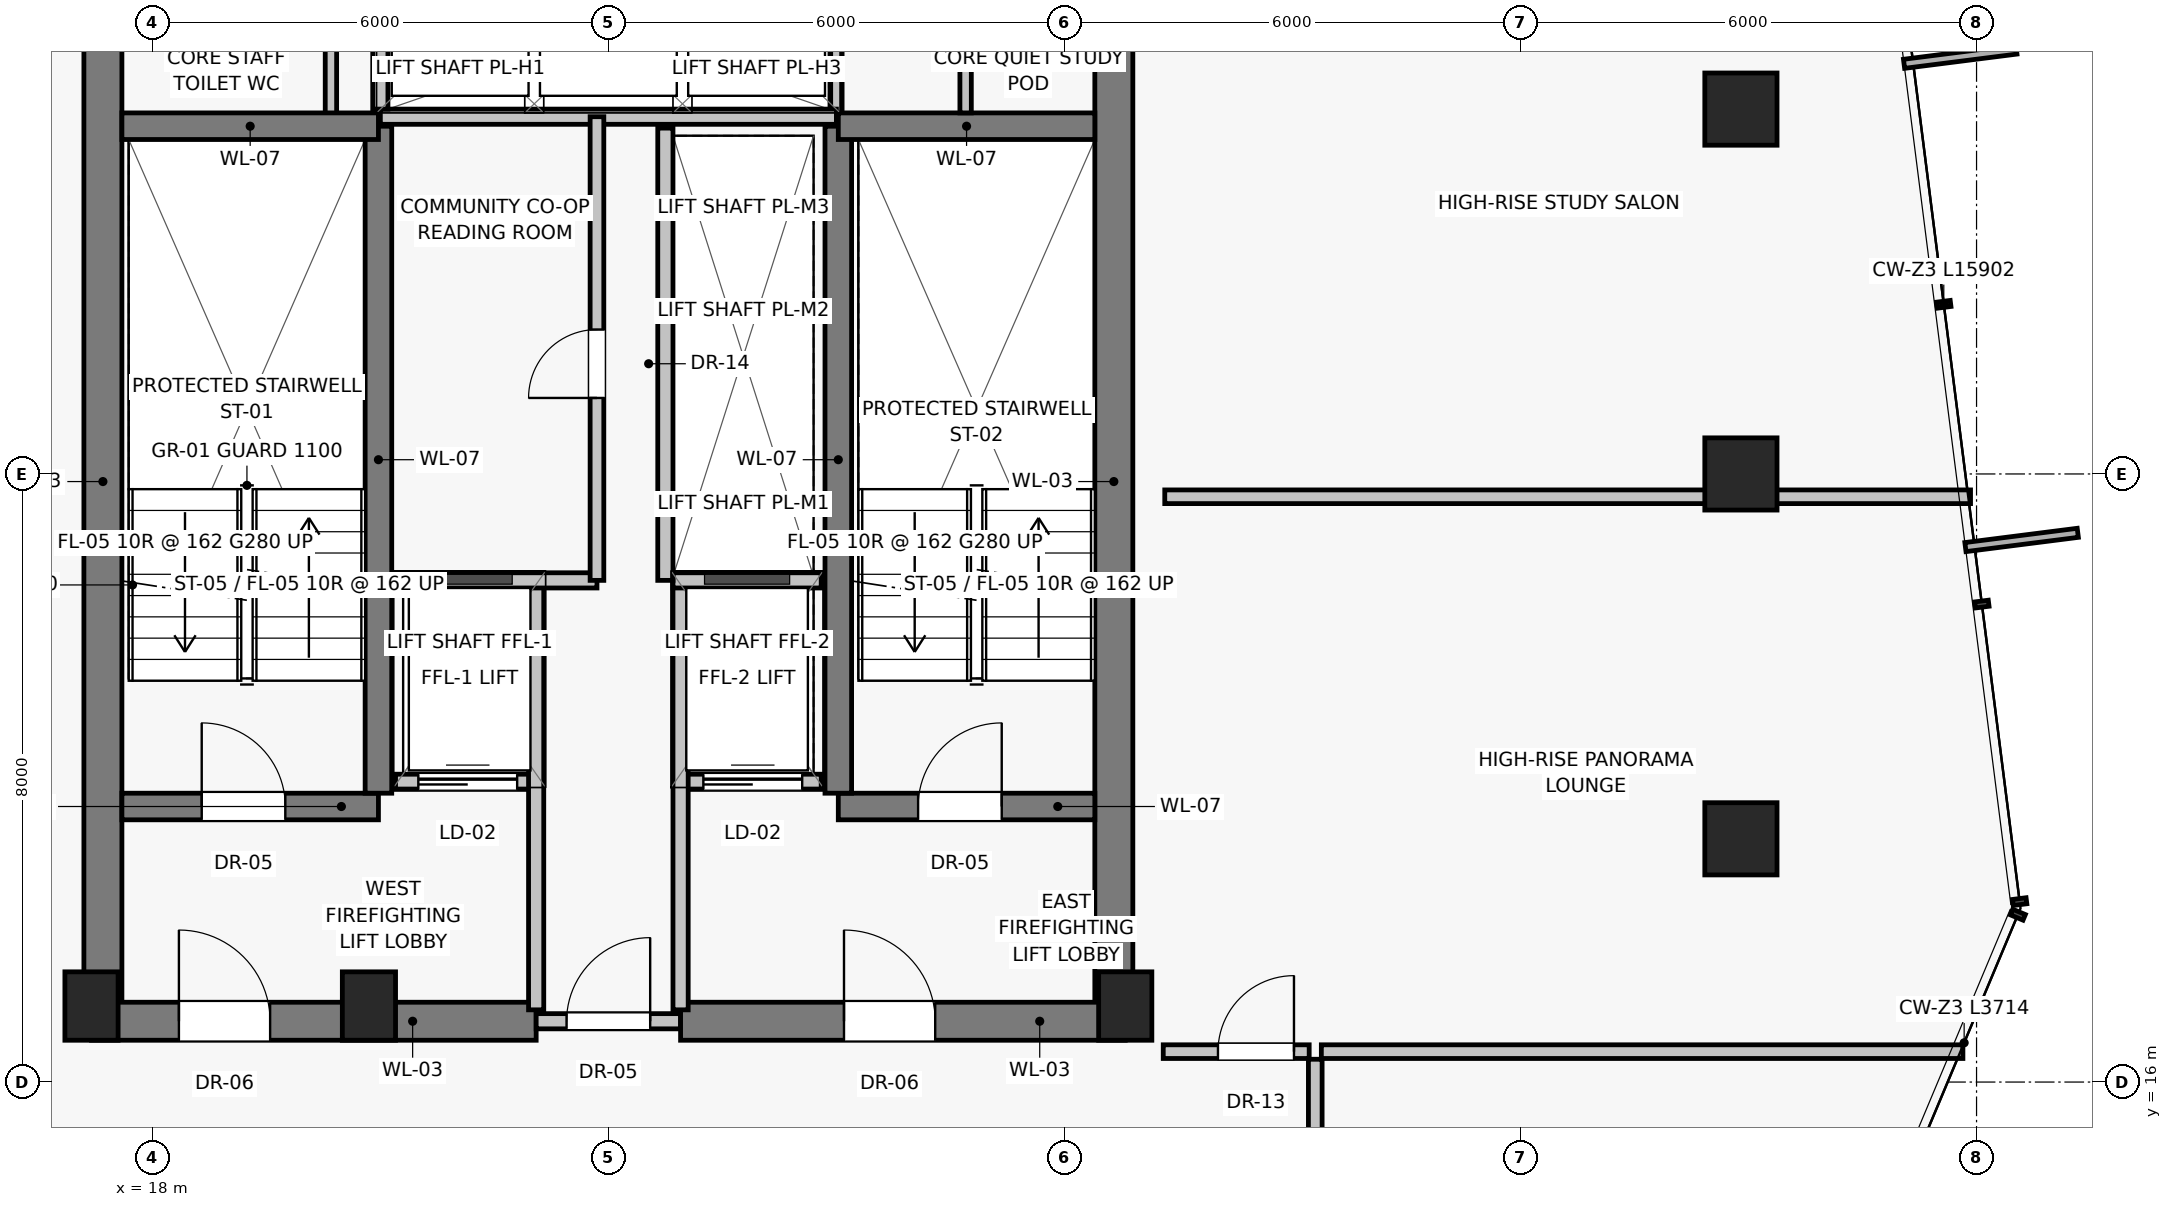
"""IFC4 building model, lengths in metres.
Left out: names, types, materials, properties, quantities, classifications, styles, units other than length and angle.
Written with IfcOpenShell. Run it as: python <this file> out.ifc"""

import sys

from ifc_helpers import new_model, si_unit, direction, frame, frame_2d, origin, origin_2d, place, context, subcontext, project, spatial, rectangle, extrude, source, transform, mapped, element, fill, save


model = new_model("IFC4")
c1 = context("Model", 3, precision=1e-05, world=origin(), true_north=direction((0.0, 1.0)))
c2 = subcontext(c1, "Body", "Model", "MODEL_VIEW")
j1 = project(units=[si_unit("LENGTHUNIT", "METRE"), si_unit("PLANEANGLEUNIT", "RADIAN")], contexts=[c1])
p1 = place(None, origin())
s1 = spatial("IfcSite", under=j1, at=p1, CompositionType="ELEMENT")
p2 = place(p1, origin())
s2 = spatial("IfcBuilding", under=s1, at=p2, CompositionType="ELEMENT")
p3 = place(p2, frame((0.0, 0.0, 182.1)))
s3 = spatial("IfcBuildingStorey", under=s2, at=p3, CompositionType="ELEMENT", Elevation=182.1)
for number, where, z_axis, x_axis in (
    (1, (17.2, 17.0, 0.0), (0.0, 0.0, 1.0), (1.0, 0.0, 0.0)),
    (2, (20.85, 17.0, 0.0), (0.0, 0.0, 1.0), (1.0, 0.0, 0.0)),
    (3, (30.8, 17.0, 0.0), (0.0, 0.0, 1.0), (1.0, 0.0, 0.0)),
):
    element("IfcColumn", number, at=place(p3, frame(where, z_axis=z_axis, x_axis=x_axis)), inside=s3, PredefinedType="PILASTER", context=c2, shape_type="SweptSolid", body=[
        extrude(rectangle(XDim=0.7, YDim=0.9, at=origin_2d()), origin(), (0.0, 0.0, 1.0), 3.25),
    ])
for number, where, z_axis, x_axis in (
    (4, (38.9, 19.2, 0.0), (0.0, 0.0, 1.0), (1.0, 0.0, 0.0)),
    (5, (38.9, 24.0, 0.0), (0.0, 0.0, 1.0), (1.0, 0.0, 0.0)),
    (6, (38.9, 28.8, 0.0), (0.0, 0.0, 1.0), (1.0, 0.0, 0.0)),
):
    element("IfcColumn", number, at=place(p3, frame(where, z_axis=z_axis, x_axis=x_axis)), inside=s3, PredefinedType="COLUMN", context=c2, shape_type="SweptSolid", body=[
        extrude(rectangle(XDim=0.95, YDim=0.95, at=origin_2d()), origin(), (0.0, 0.0, 1.0), 3.25),
    ])
for number, where, z_axis, x_axis in (
    (7, (17.35, 16.8, 0.0), (0.0, 0.0, 1.0), (0.0, 1.0, 0.0)),
    (8, (30.65, 16.8, 0.0), (0.0, 0.0, 1.0), (0.0, 1.0, 0.0)),
):
    element("IfcWall", number, at=place(p3, frame(where, z_axis=z_axis, x_axis=x_axis)), inside=s3, PredefinedType="SHEAR", context=c2, shape_type="SweptSolid", body=[
        extrude(rectangle(XDim=14.2, YDim=0.5, at=frame_2d((7.1, 0.0))), origin(), (0.0, 0.0, 1.0), 3.015),
    ])
p4 = place(p3, frame((17.2, 16.8, 0.0), z_axis=(0.0, 0.0, 1.0), x_axis=(1.0, 0.0, 0.0)))
e9 = element("IfcWall", 9, at=p4, inside=s3, PredefinedType="SHEAR", context=c2, shape_type="SweptSolid", body=[
    extrude(rectangle(XDim=5.85, YDim=0.5, at=frame_2d((2.925, 0.0))), origin(), (0.0, 0.0, 1.0), 3.015),
])
p5 = place(p4, frame((1.15, 0.0, 0.0)))
e10 = element("IfcOpeningElement", 10, at=p5, cuts=e9, PredefinedType="OPENING", context=c2, shape_type="SweptSolid", body=[
    extrude(rectangle(XDim=1.2, YDim=2.03, at=frame_2d((0.6, 1.015))), frame((0.0, 0.26, 0.0), z_axis=(0.0, -1.0, 0.0), x_axis=(1.0, 0.0, 0.0)), (0.0, 0.0, 1.0), 0.52),
])
p6 = place(p3, frame((23.05, 16.8, 0.0), z_axis=(0.0, 0.0, 1.0), x_axis=(1.0, 0.0, 0.0)))
e11 = element("IfcWall", 11, at=p6, inside=s3, PredefinedType="SOLIDWALL", context=c2, shape_type="SweptSolid", body=[
    extrude(rectangle(XDim=1.9, YDim=0.2, at=frame_2d((0.95, 0.0))), origin(), (0.0, 0.0, 1.0), 2.165),
])
p7 = place(p6, frame((0.4, 0.0, 0.0)))
e12 = element("IfcOpeningElement", 12, at=p7, cuts=e11, PredefinedType="OPENING", context=c2, shape_type="SweptSolid", body=[
    extrude(rectangle(XDim=1.1, YDim=2.03, at=frame_2d((0.55, 1.015))), frame((0.0, 0.11, 0.0), z_axis=(0.0, -1.0, 0.0), x_axis=(1.0, 0.0, 0.0)), (0.0, 0.0, 1.0), 0.22),
])
p8 = place(p3, frame((24.95, 16.8, 0.0), z_axis=(0.0, 0.0, 1.0), x_axis=(1.0, 0.0, 0.0)))
e13 = element("IfcWall", 13, at=p8, inside=s3, PredefinedType="SHEAR", context=c2, shape_type="SweptSolid", body=[
    extrude(rectangle(XDim=5.85, YDim=0.5, at=frame_2d((2.925, 0.0))), origin(), (0.0, 0.0, 1.0), 3.015),
])
p9 = place(p8, frame((2.15, 0.0, 0.0)))
e14 = element("IfcOpeningElement", 14, at=p9, cuts=e13, PredefinedType="OPENING", context=c2, shape_type="SweptSolid", body=[
    extrude(rectangle(XDim=1.2, YDim=2.03, at=frame_2d((0.6, 1.015))), frame((0.0, 0.26, 0.0), z_axis=(0.0, -1.0, 0.0), x_axis=(1.0, 0.0, 0.0)), (0.0, 0.0, 1.0), 0.52),
])
for number, where, z_axis, x_axis in (
    (15, (20.35, 28.65, 0.0), (0.0, 0.0, 1.0), (0.0, 1.0, 0.0)),
    (16, (27.0, 28.65, 0.0), (0.0, 0.0, 1.0), (0.0, 1.0, 0.0)),
):
    element("IfcWall", number, at=place(p3, frame(where, z_axis=z_axis, x_axis=x_axis)), inside=s3, PredefinedType="PARTITIONING", context=c2, shape_type="SweptSolid", body=[
        extrude(rectangle(XDim=2.2, YDim=0.15, at=frame_2d((1.1, 0.0))), origin(), (0.0, 0.0, 1.0), 3.015),
    ])
p10 = place(p3, frame((17.6, 19.625, 0.0), z_axis=(0.0, 0.0, 1.0), x_axis=(1.0, 0.0, 0.0)))
e17 = element("IfcWall", 17, at=p10, inside=s3, PredefinedType="SHEAR", context=c2, shape_type="SweptSolid", body=[
    extrude(rectangle(XDim=3.375, YDim=0.35, at=frame_2d((1.688, 0.0))), origin(), (0.0, 0.0, 1.0), 3.015),
])
p11 = place(p10, frame((1.05, 0.0, 0.0)))
e18 = element("IfcOpeningElement", 18, at=p11, cuts=e17, PredefinedType="OPENING", context=c2, shape_type="SweptSolid", body=[
    extrude(rectangle(XDim=1.1, YDim=2.03, at=frame_2d((0.55, 1.015))), frame((0.0, 0.185, 0.0), z_axis=(0.0, -1.0, 0.0), x_axis=(1.0, 0.0, 0.0)), (0.0, 0.0, 1.0), 0.37),
])
p12 = place(p3, frame((21.2, 19.95, 0.0), z_axis=(0.0, 0.0, 1.0), x_axis=(1.0, 0.0, 0.0)))
e19 = element("IfcWall", 19, at=p12, inside=s3, PredefinedType="SOLIDWALL", context=c2, shape_type="SweptSolid", body=[
    extrude(rectangle(XDim=1.85, YDim=0.2, at=frame_2d((0.925, 0.0))), origin(), (0.0, 0.0, 1.0), 3.015),
])
p13 = place(p12, frame((0.3, 0.0, 0.0)))
e20 = element("IfcOpeningElement", 20, at=p13, cuts=e19, PredefinedType="OPENING", context=c2, shape_type="SweptSolid", body=[
    extrude(rectangle(XDim=1.3, YDim=2.25, at=frame_2d((0.65, 1.125))), frame((0.0, 0.11, 0.0), z_axis=(0.0, -1.0, 0.0), x_axis=(1.0, 0.0, 0.0)), (0.0, 0.0, 1.0), 0.22),
])
p14 = place(p3, frame((24.95, 19.95, 0.0), z_axis=(0.0, 0.0, 1.0), x_axis=(1.0, 0.0, 0.0)))
e21 = element("IfcWall", 21, at=p14, inside=s3, PredefinedType="SOLIDWALL", context=c2, shape_type="SweptSolid", body=[
    extrude(rectangle(XDim=1.85, YDim=0.2, at=frame_2d((0.925, 0.0))), origin(), (0.0, 0.0, 1.0), 3.015),
])
p15 = place(p14, frame((0.3, 0.0, 0.0)))
e22 = element("IfcOpeningElement", 22, at=p15, cuts=e21, PredefinedType="OPENING", context=c2, shape_type="SweptSolid", body=[
    extrude(rectangle(XDim=1.3, YDim=2.25, at=frame_2d((0.65, 1.125))), frame((0.0, 0.11, 0.0), z_axis=(0.0, -1.0, 0.0), x_axis=(1.0, 0.0, 0.0)), (0.0, 0.0, 1.0), 0.22),
])
p16 = place(p3, frame((27.025, 19.625, 0.0), z_axis=(0.0, 0.0, 1.0), x_axis=(1.0, 0.0, 0.0)))
e23 = element("IfcWall", 23, at=p16, inside=s3, PredefinedType="SHEAR", context=c2, shape_type="SweptSolid", body=[
    extrude(rectangle(XDim=3.375, YDim=0.35, at=frame_2d((1.688, 0.0))), origin(), (0.0, 0.0, 1.0), 3.015),
])
p17 = place(p16, frame((1.05, 0.0, 0.0)))
e24 = element("IfcOpeningElement", 24, at=p17, cuts=e23, PredefinedType="OPENING", context=c2, shape_type="SweptSolid", body=[
    extrude(rectangle(XDim=1.1, YDim=2.03, at=frame_2d((0.55, 1.015))), frame((0.0, 0.185, 0.0), z_axis=(0.0, -1.0, 0.0), x_axis=(1.0, 0.0, 0.0)), (0.0, 0.0, 1.0), 0.37),
])
for number, where, z_axis, x_axis in (
    (25, (20.975, 19.8, 0.0), (0.0, 0.0, 1.0), (0.0, 1.0, 0.0)),
    (26, (27.025, 19.8, 0.0), (0.0, 0.0, 1.0), (0.0, 1.0, 0.0)),
):
    element("IfcWall", number, at=place(p3, frame(where, z_axis=z_axis, x_axis=x_axis)), inside=s3, PredefinedType="SHEAR", context=c2, shape_type="SweptSolid", body=[
        extrude(rectangle(XDim=8.775, YDim=0.35, at=frame_2d((4.387, 0.0))), origin(), (0.0, 0.0, 1.0), 3.015),
    ])
for number, where, z_axis, x_axis in (
    (27, (17.6, 28.575, 0.0), (0.0, 0.0, 1.0), (1.0, 0.0, 0.0)),
    (28, (27.025, 28.575, 0.0), (0.0, 0.0, 1.0), (1.0, 0.0, 0.0)),
):
    element("IfcWall", number, at=place(p3, frame(where, z_axis=z_axis, x_axis=x_axis)), inside=s3, PredefinedType="SHEAR", context=c2, shape_type="SweptSolid", body=[
        extrude(rectangle(XDim=3.375, YDim=0.35, at=frame_2d((1.688, 0.0))), origin(), (0.0, 0.0, 1.0), 3.015),
    ])
for number, where, z_axis, x_axis in (
    (29, (23.05, 16.95, 0.0), (0.0, 0.0, 1.0), (0.0, 1.0, 0.0)),
    (30, (24.95, 16.95, 0.0), (0.0, 0.0, 1.0), (0.0, 1.0, 0.0)),
):
    element("IfcWall", number, at=place(p3, frame(where, z_axis=z_axis, x_axis=x_axis)), inside=s3, PredefinedType="SOLIDWALL", context=c2, shape_type="SweptSolid", body=[
        extrude(rectangle(XDim=5.6, YDim=0.2, at=frame_2d((2.8, 0.0))), origin(), (0.0, 0.0, 1.0), 3.015),
    ])
p18 = place(p3, frame((21.2, 22.6, 0.0), z_axis=(0.0, 0.0, 1.0), x_axis=(1.0, 0.0, 0.0)))
e31 = element("IfcWall", 31, at=p18, inside=s3, PredefinedType="SOLIDWALL", context=c2, shape_type="SweptSolid", body=[
    extrude(rectangle(XDim=2.65, YDim=0.2, at=frame_2d((1.325, 0.0))), origin(), (0.0, 0.0, 1.0), 3.015),
])
p19 = place(p3, frame((24.85, 22.6, 0.0), z_axis=(0.0, 0.0, 1.0), x_axis=(1.0, 0.0, 0.0)))
e32 = element("IfcWall", 32, at=p19, inside=s3, PredefinedType="SOLIDWALL", context=c2, shape_type="SweptSolid", body=[
    extrude(rectangle(XDim=1.95, YDim=0.2, at=frame_2d((0.975, 0.0))), origin(), (0.0, 0.0, 1.0), 3.015),
])
p20 = place(p3, frame((21.0, 28.7, 0.0), z_axis=(0.0, 0.0, 1.0), x_axis=(1.0, 0.0, 0.0)))
e33 = element("IfcWall", 33, at=p20, inside=s3, PredefinedType="SOLIDWALL", context=c2, shape_type="SweptSolid", body=[
    extrude(rectangle(XDim=6.0, YDim=0.2, at=frame_2d((3.0, 0.0))), origin(), (0.0, 0.0, 1.0), 3.015),
])
p21 = place(p3, frame((21.0, 28.8, 0.0), z_axis=(0.0, 0.0, 1.0), x_axis=(0.0, 1.0, 0.0)))
e34 = element("IfcWall", 34, at=p21, inside=s3, PredefinedType="SOLIDWALL", context=c2, shape_type="SweptSolid", body=[
    extrude(rectangle(XDim=1.6, YDim=0.2, at=frame_2d((0.8, 0.0))), origin(), (0.0, 0.0, 1.0), 3.015),
])
p22 = place(p3, frame((23.85, 22.6, 0.0), z_axis=(0.0, 0.0, 1.0), x_axis=(0.0, 1.0, 0.0)))
e35 = element("IfcWall", 35, at=p22, inside=s3, PredefinedType="PARTITIONING", context=c2, shape_type="SweptSolid", body=[
    extrude(rectangle(XDim=6.1, YDim=0.18, at=frame_2d((3.05, 0.0))), origin(), (0.0, 0.0, 1.0), 3.015),
])
p23 = place(p22, frame((2.4, 0.0, 0.0)))
e36 = element("IfcOpeningElement", 36, at=p23, cuts=e35, PredefinedType="OPENING", context=c2, shape_type="SweptSolid", body=[
    extrude(rectangle(XDim=0.9, YDim=2.01, at=frame_2d((0.45, 1.005))), frame((0.0, 0.1, 0.0), z_axis=(0.0, -1.0, 0.0), x_axis=(1.0, 0.0, 0.0)), (0.0, 0.0, 1.0), 0.2),
])
p24 = place(p3, frame((24.75, 22.6, 0.0), z_axis=(0.0, 0.0, 1.0), x_axis=(0.0, 1.0, 0.0)))
e37 = element("IfcWall", 37, at=p24, inside=s3, PredefinedType="SOLIDWALL", context=c2, shape_type="SweptSolid", body=[
    extrude(rectangle(XDim=5.95, YDim=0.2, at=frame_2d((2.975, 0.0))), origin(), (0.0, 0.0, 1.0), 3.015),
])
p25 = place(p3, frame((28.7, 28.75, 0.0), z_axis=(0.0, 0.0, 1.0), x_axis=(0.0, 1.0, 0.0)))
e38 = element("IfcWall", 38, at=p25, inside=s3, PredefinedType="PARTITIONING", context=c2, shape_type="SweptSolid", body=[
    extrude(rectangle(XDim=2.0, YDim=0.15, at=frame_2d((1.0, 0.0))), origin(), (0.0, 0.0, 1.0), 3.015),
])
p26 = place(p3, frame((31.32, 23.7, 0.0), z_axis=(0.0, 0.0, 1.0), x_axis=(1.0, 0.0, 0.0)))
e39 = element("IfcWall", 39, at=p26, inside=s3, PredefinedType="PARTITIONING", context=c2, shape_type="SweptSolid", body=[
    extrude(rectangle(XDim=10.601, YDim=0.18, at=frame_2d((5.3, 0.0))), origin(), (0.0, 0.0, 1.0), 3.015),
])
p27 = place(p3, frame((33.3, 14.4, 0.0), z_axis=(0.0, 0.0, 1.0), x_axis=(0.0, 1.0, 0.0)))
e40 = element("IfcWall", 40, at=p27, inside=s3, PredefinedType="PARTITIONING", context=c2, shape_type="SweptSolid", body=[
    extrude(rectangle(XDim=1.9, YDim=0.18, at=frame_2d((0.95, 0.0))), origin(), (0.0, 0.0, 1.0), 3.015),
])
p28 = place(p3, frame((31.3, 16.4, 0.0), z_axis=(0.0, 0.0, 1.0), x_axis=(1.0, 0.0, 0.0)))
e41 = element("IfcWall", 41, at=p28, inside=s3, PredefinedType="PARTITIONING", context=c2, shape_type="SweptSolid", body=[
    extrude(rectangle(XDim=1.92, YDim=0.18, at=frame_2d((0.96, 0.0))), origin(), (0.0, 0.0, 1.0), 3.015),
])
p29 = place(p28, frame((0.72, 0.0, 0.0)))
e42 = element("IfcOpeningElement", 42, at=p29, cuts=e41, PredefinedType="OPENING", context=c2, shape_type="SweptSolid", body=[
    extrude(rectangle(XDim=1.0, YDim=2.01, at=frame_2d((0.5, 1.005))), frame((0.0, 0.1, 0.0), z_axis=(0.0, -1.0, 0.0), x_axis=(1.0, 0.0, 0.0)), (0.0, 0.0, 1.0), 0.2),
])
p30 = place(p3, frame((33.38, 16.4, 0.0), z_axis=(0.0, 0.0, 1.0), x_axis=(1.0, 0.0, 0.0)))
e43 = element("IfcWall", 43, at=p30, inside=s3, PredefinedType="PARTITIONING", context=c2, shape_type="SweptSolid", body=[
    extrude(rectangle(XDim=8.441, YDim=0.18, at=frame_2d((4.22, 0.0))), origin(), (0.0, 0.0, 1.0), 3.015),
])
m1 = source(origin(), c2, "Body", "SweptSolid", [
    extrude(rectangle(XDim=1.2, YDim=2.03, at=frame_2d((0.6, 1.015))), frame((0.0, 0.025, 0.0), z_axis=(0.0, -1.0, 0.0), x_axis=(1.0, 0.0, 0.0)), (0.0, 0.0, 1.0), 0.05),
])
p31 = place(p5, origin())
e44 = element("IfcDoor", 44, at=p31, inside=s3, OperationType="SINGLE_SWING_LEFT", PredefinedType="DOOR", context=c2, shape_type="MappedRepresentation", body=[
    mapped(m1, transform((0.0, 0.0, 0.0), scale=1.0)),
])
fill(e10, e44)
m2 = source(origin(), c2, "Body", "SweptSolid", [
    extrude(rectangle(XDim=1.1, YDim=2.03, at=frame_2d((0.55, 1.015))), frame((0.0, 0.025, 0.0), z_axis=(0.0, -1.0, 0.0), x_axis=(1.0, 0.0, 0.0)), (0.0, 0.0, 1.0), 0.05),
])
p32 = place(p7, origin())
e45 = element("IfcDoor", 45, at=p32, inside=s3, OperationType="SINGLE_SWING_RIGHT", PredefinedType="DOOR", context=c2, shape_type="MappedRepresentation", body=[
    mapped(m2, transform((0.0, 0.0, 0.0), scale=1.0)),
])
fill(e12, e45)
p33 = place(p9, origin())
e46 = element("IfcDoor", 46, at=p33, inside=s3, OperationType="SINGLE_SWING_LEFT", PredefinedType="DOOR", context=c2, shape_type="MappedRepresentation", body=[
    mapped(m1, transform((0.0, 0.0, 0.0), scale=1.0)),
])
fill(e14, e46)
p34 = place(p11, origin())
e47 = element("IfcDoor", 47, at=p34, inside=s3, OperationType="SINGLE_SWING_LEFT", PredefinedType="DOOR", context=c2, shape_type="MappedRepresentation", body=[
    mapped(m2, transform((0.0, 0.0, 0.0), scale=1.0)),
])
fill(e18, e47)
m3 = source(origin(), c2, "Body", "SweptSolid", [
    extrude(rectangle(XDim=1.3, YDim=2.25, at=frame_2d((0.65, 1.125))), frame((0.0, 0.025, 0.0), z_axis=(0.0, -1.0, 0.0), x_axis=(1.0, 0.0, 0.0)), (0.0, 0.0, 1.0), 0.05),
])
p35 = place(p13, origin())
e48 = element("IfcDoor", 48, at=p35, inside=s3, OperationType="SLIDING_TO_LEFT", PredefinedType="DOOR", context=c2, shape_type="MappedRepresentation", body=[
    mapped(m3, transform((0.0, 0.0, 0.0), scale=1.0)),
])
fill(e20, e48)
p36 = place(p15, origin())
e49 = element("IfcDoor", 49, at=p36, inside=s3, OperationType="SLIDING_TO_LEFT", PredefinedType="DOOR", context=c2, shape_type="MappedRepresentation", body=[
    mapped(m3, transform((0.0, 0.0, 0.0), scale=1.0)),
])
fill(e22, e49)
p37 = place(p17, origin())
e50 = element("IfcDoor", 50, at=p37, inside=s3, OperationType="SINGLE_SWING_RIGHT", PredefinedType="DOOR", context=c2, shape_type="MappedRepresentation", body=[
    mapped(m2, transform((0.0, 0.0, 0.0), scale=1.0)),
])
fill(e24, e50)
m4 = source(origin(), c2, "Body", "SweptSolid", [
    extrude(rectangle(XDim=0.9, YDim=2.01, at=frame_2d((0.45, 1.005))), frame((0.0, 0.025, 0.0), z_axis=(0.0, -1.0, 0.0), x_axis=(1.0, 0.0, 0.0)), (0.0, 0.0, 1.0), 0.05),
])
p38 = place(p23, origin())
e51 = element("IfcDoor", 51, at=p38, inside=s3, OperationType="SINGLE_SWING_LEFT", PredefinedType="DOOR", context=c2, shape_type="MappedRepresentation", body=[
    mapped(m4, transform((0.0, 0.0, 0.0), scale=1.0)),
])
fill(e36, e51)
m5 = source(origin(), c2, "Body", "SweptSolid", [
    extrude(rectangle(XDim=1.0, YDim=2.01, at=frame_2d((0.5, 1.005))), frame((0.0, 0.025, 0.0), z_axis=(0.0, -1.0, 0.0), x_axis=(1.0, 0.0, 0.0)), (0.0, 0.0, 1.0), 0.05),
])
p39 = place(p29, origin())
e52 = element("IfcDoor", 52, at=p39, inside=s3, OperationType="SINGLE_SWING_RIGHT", PredefinedType="DOOR", context=c2, shape_type="MappedRepresentation", body=[
    mapped(m5, transform((0.0, 0.0, 0.0), scale=1.0)),
])
fill(e42, e52)
save(model, sys.argv[1])
